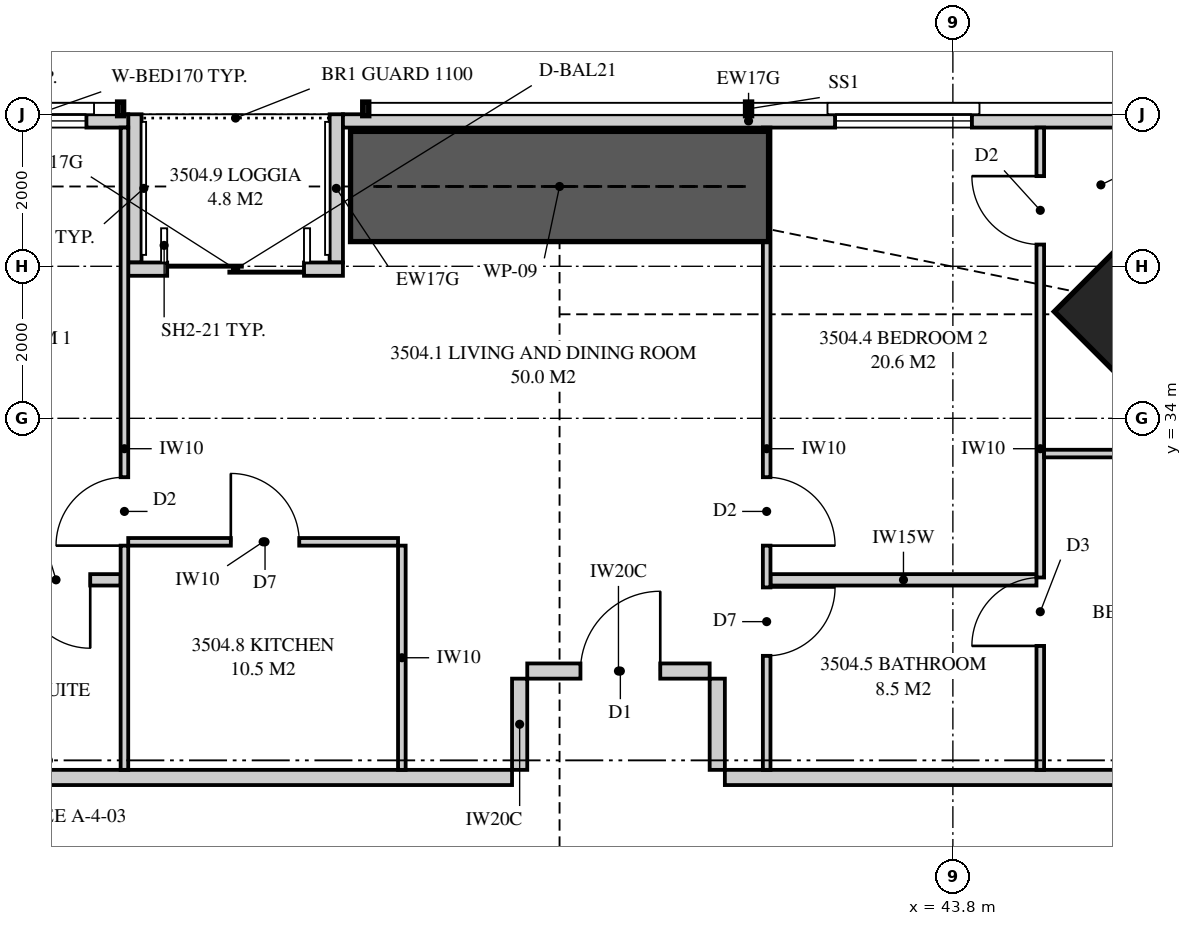
"""IFC4 building model, lengths in metres.
Left out: names, types, materials, properties, quantities, classifications, styles, units other than length and angle.
Written with IfcOpenShell. Run it as: python <this file> out.ifc"""

import sys

from ifc_helpers import new_model, si_unit, direction, frame, frame_2d, origin, origin_2d, place, context, subcontext, project, spatial, polyline, rectangle, outline, extrude, element, fill, save


model = new_model("IFC4")
c1 = context("Model", 3, precision=1e-05, world=origin(), true_north=direction((0.0, 1.0)))
c2 = subcontext(c1, "Body", "Model", "MODEL_VIEW")
j1 = project(units=[si_unit("LENGTHUNIT", "METRE"), si_unit("PLANEANGLEUNIT", "RADIAN")], contexts=[c1])
p1 = place(None, origin())
s1 = spatial("IfcSite", under=j1, at=p1, CompositionType="ELEMENT")
p2 = place(p1, origin())
s2 = spatial("IfcBuilding", under=s1, at=p2, CompositionType="ELEMENT")
p3 = place(p2, frame((0.0, 0.0, 128.3)))
s3 = spatial("IfcBuildingStorey", under=s2, at=p3, CompositionType="ELEMENT", Elevation=128.3)
p4 = place(p3, frame((46.869, 35.369, 0.0), z_axis=(0.0, 0.0, 1.0), x_axis=(-0.707106781187, -0.707106781187, 0.0)))
e1 = element("IfcColumn", 1, at=p4, inside=s3, PredefinedType="COLUMN", context=c2, shape_type="SweptSolid", body=[
    extrude(rectangle(XDim=2.4, YDim=2.5, at=origin_2d()), origin(), (0.0, 0.0, 1.0), 3.35),
])
p5 = place(p3, frame((46.449, 37.913, 0.0), z_axis=(0.0, 0.0, 1.0), x_axis=(-1.0, 0.0, 0.0)))
e2 = element("IfcWall", 2, at=p5, inside=s3, PredefinedType="SOLIDWALL", context=c2, shape_type="SweptSolid", body=[
    extrude(outline(polyline([(0.0, 0.0), (10.674, 0.0), (10.674, 2.15), (7.824, 2.15), (7.824, 3.11), (7.666, 3.11), (7.666, 2.15), (7.62, 2.15), (7.62, 3.11), (0.0, 3.11), (0.0, 0.0)])), frame((0.0, 0.087, 0.0), z_axis=(0.0, -1.0, 0.0), x_axis=(1.0, 0.0, 0.0)), (0.0, 0.0, 1.0), 0.175),
])
p6 = place(p5, frame((2.399, 0.0, 0.4)))
e3 = element("IfcOpeningElement", 3, at=p6, cuts=e2, PredefinedType="OPENING", context=c2, shape_type="SweptSolid", body=[
    extrude(rectangle(XDim=1.8, YDim=1.7, at=frame_2d((0.9, 0.85))), frame((0.0, 0.097, 0.0), z_axis=(0.0, -1.0, 0.0), x_axis=(1.0, 0.0, 0.0)), (0.0, 0.0, 1.0), 0.195),
])
p7 = place(p3, frame((32.95, 37.913, 0.0), z_axis=(0.0, 0.0, 1.0), x_axis=(-1.0, 0.0, 0.0)))
e4 = element("IfcWall", 4, at=p7, inside=s3, PredefinedType="SOLIDWALL", context=c2, shape_type="SweptSolid", body=[
    extrude(rectangle(XDim=8.075, YDim=0.175, at=frame_2d((4.038, 0.0))), origin(), (0.0, 0.0, 1.0), 2.15),
])
p8 = place(p7, frame((0.55, 0.0, 0.4)))
e5 = element("IfcOpeningElement", 5, at=p8, cuts=e4, PredefinedType="OPENING", context=c2, shape_type="SweptSolid", body=[
    extrude(rectangle(XDim=1.8, YDim=1.7, at=frame_2d((0.9, 0.85))), frame((0.0, 0.097, 0.0), z_axis=(0.0, -1.0, 0.0), x_axis=(1.0, 0.0, 0.0)), (0.0, 0.0, 1.0), 0.195),
])
p9 = place(p3, frame((35.775, 35.962, 0.0), z_axis=(0.0, 0.0, 1.0), x_axis=(-1.0, 0.0, 0.0)))
e6 = element("IfcWall", 6, at=p9, inside=s3, PredefinedType="SOLIDWALL", context=c2, shape_type="SweptSolid", body=[
    extrude(rectangle(XDim=2.825, YDim=0.175, at=frame_2d((1.413, 0.0))), origin(), (0.0, 0.0, 1.0), 3.11),
])
p10 = place(p9, frame((0.512, 0.0, 0.0)))
e7 = element("IfcOpeningElement", 7, at=p10, cuts=e6, PredefinedType="OPENING", context=c2, shape_type="SweptSolid", body=[
    extrude(rectangle(XDim=1.8, YDim=2.1, at=frame_2d((0.9, 1.05))), frame((0.0, 0.097, 0.0), z_axis=(0.0, -1.0, 0.0), x_axis=(1.0, 0.0, 0.0)), (0.0, 0.0, 1.0), 0.195),
])
for number, where, z_axis, x_axis in (
    (8, (35.688, 38.0, 0.0), (0.0, 0.0, 1.0), (0.0, -1.0, 0.0)),
    (9, (33.038, 38.0, 0.0), (0.0, 0.0, 1.0), (0.0, -1.0, 0.0)),
):
    element("IfcWall", number, at=place(p3, frame(where, z_axis=z_axis, x_axis=x_axis)), inside=s3, PredefinedType="SOLIDWALL", context=c2, shape_type="SweptSolid", body=[
        extrude(outline(polyline([(0.0, 0.0), (1.95, 0.0), (1.95, 3.11), (1.75, 3.11), (1.75, 2.15), (0.15, 2.15), (0.15, 3.11), (0.0, 3.11), (0.0, 0.0)])), frame((0.0, 0.087, 0.0), z_axis=(0.0, -1.0, 0.0), x_axis=(1.0, 0.0, 0.0)), (0.0, 0.0, 1.0), 0.175),
    ])
p11 = place(p3, frame((29.4, 29.275, 0.0), z_axis=(0.0, 0.0, 1.0), x_axis=(1.0, 0.0, 0.0)))
e10 = element("IfcWall", 10, at=p11, inside=s3, PredefinedType="PARTITIONING", context=c2, shape_type="SweptSolid", body=[
    extrude(rectangle(XDim=8.6, YDim=0.2, at=frame_2d((4.3, 0.0))), origin(), (0.0, 0.0, 1.0), 3.11),
])
p12 = place(p3, frame((32.9, 37.825, 0.0), z_axis=(0.0, 0.0, 1.0), x_axis=(0.0, -1.0, 0.0)))
e11 = element("IfcWall", 11, at=p12, inside=s3, PredefinedType="PARTITIONING", context=c2, shape_type="SweptSolid", body=[
    extrude(outline(polyline([(0.0, 0.0), (8.45, 0.0), (8.45, 3.11), (1.635, 3.11), (1.635, 2.15), (0.0, 2.15), (0.0, 3.11), (0.0, 0.0)])), frame((0.0, 0.05, 0.0), z_axis=(0.0, -1.0, 0.0), x_axis=(1.0, 0.0, 0.0)), (0.0, 0.0, 1.0), 0.1),
])
p13 = place(p12, frame((4.6, 0.0, 0.0)))
e12 = element("IfcOpeningElement", 12, at=p13, cuts=e11, PredefinedType="OPENING", context=c2, shape_type="SweptSolid", body=[
    extrude(rectangle(XDim=0.9, YDim=2.1, at=frame_2d((0.45, 1.05))), frame((0.0, 0.06, 0.0), z_axis=(0.0, -1.0, 0.0), x_axis=(1.0, 0.0, 0.0)), (0.0, 0.0, 1.0), 0.12),
])
p14 = place(p3, frame((41.35, 37.825, 0.0), z_axis=(0.0, 0.0, 1.0), x_axis=(0.0, -1.0, 0.0)))
e13 = element("IfcWall", 13, at=p14, inside=s3, PredefinedType="PARTITIONING", context=c2, shape_type="SweptSolid", body=[
    extrude(outline(polyline([(0.0, 0.0), (8.45, 0.0), (8.45, 3.11), (3.716, 3.11), (3.716, 2.51), (2.208, 2.51), (2.208, 2.15), (0.453, 2.15), (0.453, 3.11), (0.0, 3.11), (0.0, 0.0)])), frame((0.0, 0.05, 0.0), z_axis=(0.0, -1.0, 0.0), x_axis=(1.0, 0.0, 0.0)), (0.0, 0.0, 1.0), 0.1),
])
p15 = place(p14, frame((4.6, 0.0, 0.0)))
e14 = element("IfcOpeningElement", 14, at=p15, cuts=e13, PredefinedType="OPENING", context=c2, shape_type="SweptSolid", body=[
    extrude(rectangle(XDim=0.9, YDim=2.1, at=frame_2d((0.45, 1.05))), frame((0.0, 0.06, 0.0), z_axis=(0.0, -1.0, 0.0), x_axis=(1.0, 0.0, 0.0)), (0.0, 0.0, 1.0), 0.12),
])
p16 = place(p14, frame((6.05, 0.0, 0.0)))
e15 = element("IfcOpeningElement", 15, at=p16, cuts=e13, PredefinedType="OPENING", context=c2, shape_type="SweptSolid", body=[
    extrude(rectangle(XDim=0.9, YDim=2.1, at=frame_2d((0.45, 1.05))), frame((0.0, 0.06, 0.0), z_axis=(0.0, -1.0, 0.0), x_axis=(1.0, 0.0, 0.0)), (0.0, 0.0, 1.0), 0.12),
])
p17 = place(p3, frame((44.95, 37.825, 0.0), z_axis=(0.0, 0.0, 1.0), x_axis=(0.0, -1.0, 0.0)))
e16 = element("IfcWall", 16, at=p17, inside=s3, PredefinedType="PARTITIONING", context=c2, shape_type="SweptSolid", body=[
    extrude(outline(polyline([(0.0, 0.0), (8.45, 0.0), (8.45, 3.11), (3.716, 3.11), (3.716, 2.51), (2.943, 2.51), (2.943, 2.15), (1.188, 2.15), (1.188, 3.11), (0.0, 3.11), (0.0, 0.0)])), frame((0.0, 0.05, 0.0), z_axis=(0.0, -1.0, 0.0), x_axis=(1.0, 0.0, 0.0)), (0.0, 0.0, 1.0), 0.1),
])
p18 = place(p17, frame((0.639, 0.0, 0.0)))
e17 = element("IfcOpeningElement", 17, at=p18, cuts=e16, PredefinedType="OPENING", context=c2, shape_type="SweptSolid", body=[
    extrude(rectangle(XDim=0.9, YDim=2.1, at=frame_2d((0.45, 1.05))), frame((0.0, 0.06, 0.0), z_axis=(0.0, -1.0, 0.0), x_axis=(1.0, 0.0, 0.0)), (0.0, 0.0, 1.0), 0.12),
])
p19 = place(p17, frame((5.919, 0.0, 0.0)))
e18 = element("IfcOpeningElement", 18, at=p19, cuts=e16, PredefinedType="OPENING", context=c2, shape_type="SweptSolid", body=[
    extrude(rectangle(XDim=0.9, YDim=2.1, at=frame_2d((0.45, 1.05))), frame((0.0, 0.06, 0.0), z_axis=(0.0, -1.0, 0.0), x_axis=(1.0, 0.0, 0.0)), (0.0, 0.0, 1.0), 0.12),
])
p20 = place(p3, frame((29.4, 31.875, 0.0), z_axis=(0.0, 0.0, 1.0), x_axis=(1.0, 0.0, 0.0)))
e19 = element("IfcWall", 19, at=p20, inside=s3, PredefinedType="PLUMBINGWALL", context=c2, shape_type="SweptSolid", body=[
    extrude(rectangle(XDim=3.45, YDim=0.15, at=frame_2d((1.725, 0.0))), origin(), (0.0, 0.0, 1.0), 3.11),
])
p21 = place(p20, frame((2.15, 0.0, 0.0)))
e20 = element("IfcOpeningElement", 20, at=p21, cuts=e19, PredefinedType="OPENING", context=c2, shape_type="SweptSolid", body=[
    extrude(rectangle(XDim=0.9, YDim=2.1, at=frame_2d((0.45, 1.05))), frame((0.0, 0.085, 0.0), z_axis=(0.0, -1.0, 0.0), x_axis=(1.0, 0.0, 0.0)), (0.0, 0.0, 1.0), 0.17),
])
p22 = place(p3, frame((41.4, 31.875, 0.0), z_axis=(0.0, 0.0, 1.0), x_axis=(1.0, 0.0, 0.0)))
e21 = element("IfcWall", 21, at=p22, inside=s3, PredefinedType="PLUMBINGWALL", context=c2, shape_type="SweptSolid", body=[
    extrude(rectangle(XDim=3.5, YDim=0.15, at=frame_2d((1.75, 0.0))), origin(), (0.0, 0.0, 1.0), 3.11),
])
p23 = place(p3, frame((45.0, 33.536, 0.0), z_axis=(0.0, 0.0, 1.0), x_axis=(1.0, 0.0, 0.0)))
e22 = element("IfcWall", 22, at=p23, inside=s3, PredefinedType="PARTITIONING", context=c2, shape_type="SweptSolid", body=[
    extrude(outline(polyline([(0.0, 0.0), (4.5, 0.0), (4.5, 3.11), (3.037, 3.11), (3.037, 2.15), (1.294, 2.15), (1.294, 3.11), (0.0, 3.11), (0.0, 0.0)])), frame((0.0, 0.05, 0.0), z_axis=(0.0, -1.0, 0.0), x_axis=(1.0, 0.0, 0.0)), (0.0, 0.0, 1.0), 0.1),
])
p24 = place(p23, frame((2.9, 0.0, 0.0)))
e23 = element("IfcOpeningElement", 23, at=p24, cuts=e22, PredefinedType="OPENING", context=c2, shape_type="SweptSolid", body=[
    extrude(rectangle(XDim=0.9, YDim=2.1, at=frame_2d((0.45, 1.05))), frame((0.0, 0.06, 0.0), z_axis=(0.0, -1.0, 0.0), x_axis=(1.0, 0.0, 0.0)), (0.0, 0.0, 1.0), 0.12),
])
p25 = place(p3, frame((32.95, 32.375, 0.0), z_axis=(0.0, 0.0, 1.0), x_axis=(1.0, 0.0, 0.0)))
e24 = element("IfcWall", 24, at=p25, inside=s3, PredefinedType="PARTITIONING", context=c2, shape_type="SweptSolid", body=[
    extrude(rectangle(XDim=3.55, YDim=0.1, at=frame_2d((1.775, 0.0))), origin(), (0.0, 0.0, 1.0), 3.11),
])
p26 = place(p25, frame((1.35, 0.0, 0.0)))
e25 = element("IfcOpeningElement", 25, at=p26, cuts=e24, PredefinedType="OPENING", context=c2, shape_type="SweptSolid", body=[
    extrude(rectangle(XDim=0.9, YDim=2.1, at=frame_2d((0.45, 1.05))), frame((0.0, 0.06, 0.0), z_axis=(0.0, -1.0, 0.0), x_axis=(1.0, 0.0, 0.0)), (0.0, 0.0, 1.0), 0.12),
])
p27 = place(p3, frame((36.55, 32.325, 0.0), z_axis=(0.0, 0.0, 1.0), x_axis=(0.0, -1.0, 0.0)))
e26 = element("IfcWall", 26, at=p27, inside=s3, PredefinedType="PARTITIONING", context=c2, shape_type="SweptSolid", body=[
    extrude(rectangle(XDim=2.95, YDim=0.1, at=frame_2d((1.475, 0.0))), origin(), (0.0, 0.0, 1.0), 3.11),
])
p28 = place(p3, frame((40.8, 29.275, 0.0), z_axis=(0.0, 0.0, 1.0), x_axis=(1.0, 0.0, 0.0)))
e27 = element("IfcWall", 27, at=p28, inside=s3, PredefinedType="PARTITIONING", context=c2, shape_type="SweptSolid", body=[
    extrude(rectangle(XDim=5.225, YDim=0.2, at=frame_2d((2.612, 0.0))), origin(), (0.0, 0.0, 1.0), 3.11),
])
p29 = place(p3, frame((38.2, 30.675, 0.0), z_axis=(0.0, 0.0, 1.0), x_axis=(1.0, 0.0, 0.0)))
e28 = element("IfcWall", 28, at=p29, inside=s3, PredefinedType="PARTITIONING", context=c2, shape_type="SweptSolid", body=[
    extrude(outline(polyline([(0.0, 0.0), (2.4, 0.0), (2.4, 3.11), (0.762, 3.11), (0.762, 2.541), (0.088, 2.541), (0.088, 3.11), (0.0, 3.11), (0.0, 0.0)])), frame((0.0, 0.1, 0.0), z_axis=(0.0, -1.0, 0.0), x_axis=(1.0, 0.0, 0.0)), (0.0, 0.0, 1.0), 0.2),
])
p30 = place(p29, frame((0.7, 0.0, 0.0)))
e29 = element("IfcOpeningElement", 29, at=p30, cuts=e28, PredefinedType="OPENING", context=c2, shape_type="SweptSolid", body=[
    extrude(rectangle(XDim=1.05, YDim=2.2, at=frame_2d((0.525, 1.1))), frame((0.0, 0.11, 0.0), z_axis=(0.0, -1.0, 0.0), x_axis=(1.0, 0.0, 0.0)), (0.0, 0.0, 1.0), 0.22),
])
for number, where, z_axis, x_axis in (
    (30, (38.1, 29.375, 0.0), (0.0, 0.0, 1.0), (0.0, 1.0, 0.0)),
    (31, (40.7, 29.375, 0.0), (0.0, 0.0, 1.0), (0.0, 1.0, 0.0)),
):
    element("IfcWall", number, at=place(p3, frame(where, z_axis=z_axis, x_axis=x_axis)), inside=s3, PredefinedType="PARTITIONING", context=c2, shape_type="SweptSolid", body=[
        extrude(rectangle(XDim=1.2, YDim=0.2, at=frame_2d((0.6, 0.0))), origin(), (0.0, 0.0, 1.0), 3.11),
    ])
p31 = place(p3, frame((35.875, 37.05, 0.0), z_axis=(0.0, 0.0, 1.0), x_axis=(1.0, 0.0, 0.0)))
e32 = element("IfcWall", 32, at=p31, inside=s3, PredefinedType="SHEAR", context=c2, shape_type="SweptSolid", body=[
    extrude(rectangle(XDim=5.5, YDim=1.45, at=frame_2d((2.75, 0.0))), origin(), (0.0, 0.0, 1.0), 3.35),
])
p32 = place(p6, origin())
e33 = element("IfcWindow", 33, at=p32, inside=s3, PartitioningType="SINGLE_PANEL", PredefinedType="WINDOW", context=c2, shape_type="SweptSolid", body=[
    extrude(rectangle(XDim=1.8, YDim=1.7, at=frame_2d((0.9, 0.85))), frame((0.0, 0.03, 0.0), z_axis=(0.0, -1.0, 0.0), x_axis=(1.0, 0.0, 0.0)), (0.0, 0.0, 1.0), 0.06),
])
fill(e3, e33)
p33 = place(p10, origin())
e34 = element("IfcDoor", 34, at=p33, inside=s3, OperationType="SLIDING_TO_LEFT", PredefinedType="DOOR", context=c2, shape_type="SweptSolid", body=[
    extrude(rectangle(XDim=1.8, YDim=2.1, at=frame_2d((0.9, 1.05))), frame((0.0, 0.025, 0.0), z_axis=(0.0, -1.0, 0.0), x_axis=(1.0, 0.0, 0.0)), (0.0, 0.0, 1.0), 0.05),
])
fill(e7, e34)
p34 = place(p8, origin())
e35 = element("IfcWindow", 35, at=p34, inside=s3, PartitioningType="SINGLE_PANEL", PredefinedType="WINDOW", context=c2, shape_type="SweptSolid", body=[
    extrude(rectangle(XDim=1.8, YDim=1.7, at=frame_2d((0.9, 0.85))), frame((0.0, 0.03, 0.0), z_axis=(0.0, -1.0, 0.0), x_axis=(1.0, 0.0, 0.0)), (0.0, 0.0, 1.0), 0.06),
])
fill(e5, e35)
p35 = place(p30, origin())
e36 = element("IfcDoor", 36, at=p35, inside=s3, OperationType="SINGLE_SWING_RIGHT", PredefinedType="DOOR", context=c2, shape_type="SweptSolid", body=[
    extrude(rectangle(XDim=1.05, YDim=2.2, at=frame_2d((0.525, 1.1))), frame((0.0, 0.025, 0.0), z_axis=(0.0, -1.0, 0.0), x_axis=(1.0, 0.0, 0.0)), (0.0, 0.0, 1.0), 0.05),
])
fill(e29, e36)
p36 = place(p13, frame((0.9, 0.0, 0.0), z_axis=(0.0, 0.0, 1.0), x_axis=(-1.0, 0.0, 0.0)))
e37 = element("IfcDoor", 37, at=p36, inside=s3, OperationType="SINGLE_SWING_LEFT", PredefinedType="DOOR", context=c2, shape_type="SweptSolid", body=[
    extrude(rectangle(XDim=0.9, YDim=2.1, at=frame_2d((0.45, 1.05))), frame((0.0, 0.025, 0.0), z_axis=(0.0, -1.0, 0.0), x_axis=(1.0, 0.0, 0.0)), (0.0, 0.0, 1.0), 0.05),
])
fill(e12, e37)
p37 = place(p21, frame((0.9, 0.0, 0.0), z_axis=(0.0, 0.0, 1.0), x_axis=(-1.0, 0.0, 0.0)))
e38 = element("IfcDoor", 38, at=p37, inside=s3, OperationType="SINGLE_SWING_LEFT", PredefinedType="DOOR", context=c2, shape_type="SweptSolid", body=[
    extrude(rectangle(XDim=0.9, YDim=2.1, at=frame_2d((0.45, 1.05))), frame((0.0, 0.025, 0.0), z_axis=(0.0, -1.0, 0.0), x_axis=(1.0, 0.0, 0.0)), (0.0, 0.0, 1.0), 0.05),
])
fill(e20, e38)
p38 = place(p15, origin())
e39 = element("IfcDoor", 39, at=p38, inside=s3, OperationType="SINGLE_SWING_RIGHT", PredefinedType="DOOR", context=c2, shape_type="SweptSolid", body=[
    extrude(rectangle(XDim=0.9, YDim=2.1, at=frame_2d((0.45, 1.05))), frame((0.0, 0.025, 0.0), z_axis=(0.0, -1.0, 0.0), x_axis=(1.0, 0.0, 0.0)), (0.0, 0.0, 1.0), 0.05),
])
fill(e14, e39)
p39 = place(p16, origin())
e40 = element("IfcDoor", 40, at=p39, inside=s3, OperationType="SINGLE_SWING_LEFT", PredefinedType="DOOR", context=c2, shape_type="SweptSolid", body=[
    extrude(rectangle(XDim=0.9, YDim=2.1, at=frame_2d((0.45, 1.05))), frame((0.0, 0.025, 0.0), z_axis=(0.0, -1.0, 0.0), x_axis=(1.0, 0.0, 0.0)), (0.0, 0.0, 1.0), 0.05),
])
fill(e15, e40)
p40 = place(p18, frame((0.9, 0.0, 0.0), z_axis=(0.0, 0.0, 1.0), x_axis=(-1.0, 0.0, 0.0)))
e41 = element("IfcDoor", 41, at=p40, inside=s3, OperationType="SINGLE_SWING_RIGHT", PredefinedType="DOOR", context=c2, shape_type="SweptSolid", body=[
    extrude(rectangle(XDim=0.9, YDim=2.1, at=frame_2d((0.45, 1.05))), frame((0.0, 0.025, 0.0), z_axis=(0.0, -1.0, 0.0), x_axis=(1.0, 0.0, 0.0)), (0.0, 0.0, 1.0), 0.05),
])
fill(e17, e41)
p41 = place(p19, frame((0.9, 0.0, 0.0), z_axis=(0.0, 0.0, 1.0), x_axis=(-1.0, 0.0, 0.0)))
e42 = element("IfcDoor", 42, at=p41, inside=s3, OperationType="SINGLE_SWING_LEFT", PredefinedType="DOOR", context=c2, shape_type="SweptSolid", body=[
    extrude(rectangle(XDim=0.9, YDim=2.1, at=frame_2d((0.45, 1.05))), frame((0.0, 0.025, 0.0), z_axis=(0.0, -1.0, 0.0), x_axis=(1.0, 0.0, 0.0)), (0.0, 0.0, 1.0), 0.05),
])
fill(e18, e42)
p42 = place(p26, origin())
e43 = element("IfcDoor", 43, at=p42, inside=s3, OperationType="SINGLE_SWING_LEFT", PredefinedType="DOOR", context=c2, shape_type="SweptSolid", body=[
    extrude(rectangle(XDim=0.9, YDim=2.1, at=frame_2d((0.45, 1.05))), frame((0.0, 0.025, 0.0), z_axis=(0.0, -1.0, 0.0), x_axis=(1.0, 0.0, 0.0)), (0.0, 0.0, 1.0), 0.05),
])
fill(e25, e43)
save(model, sys.argv[1])
